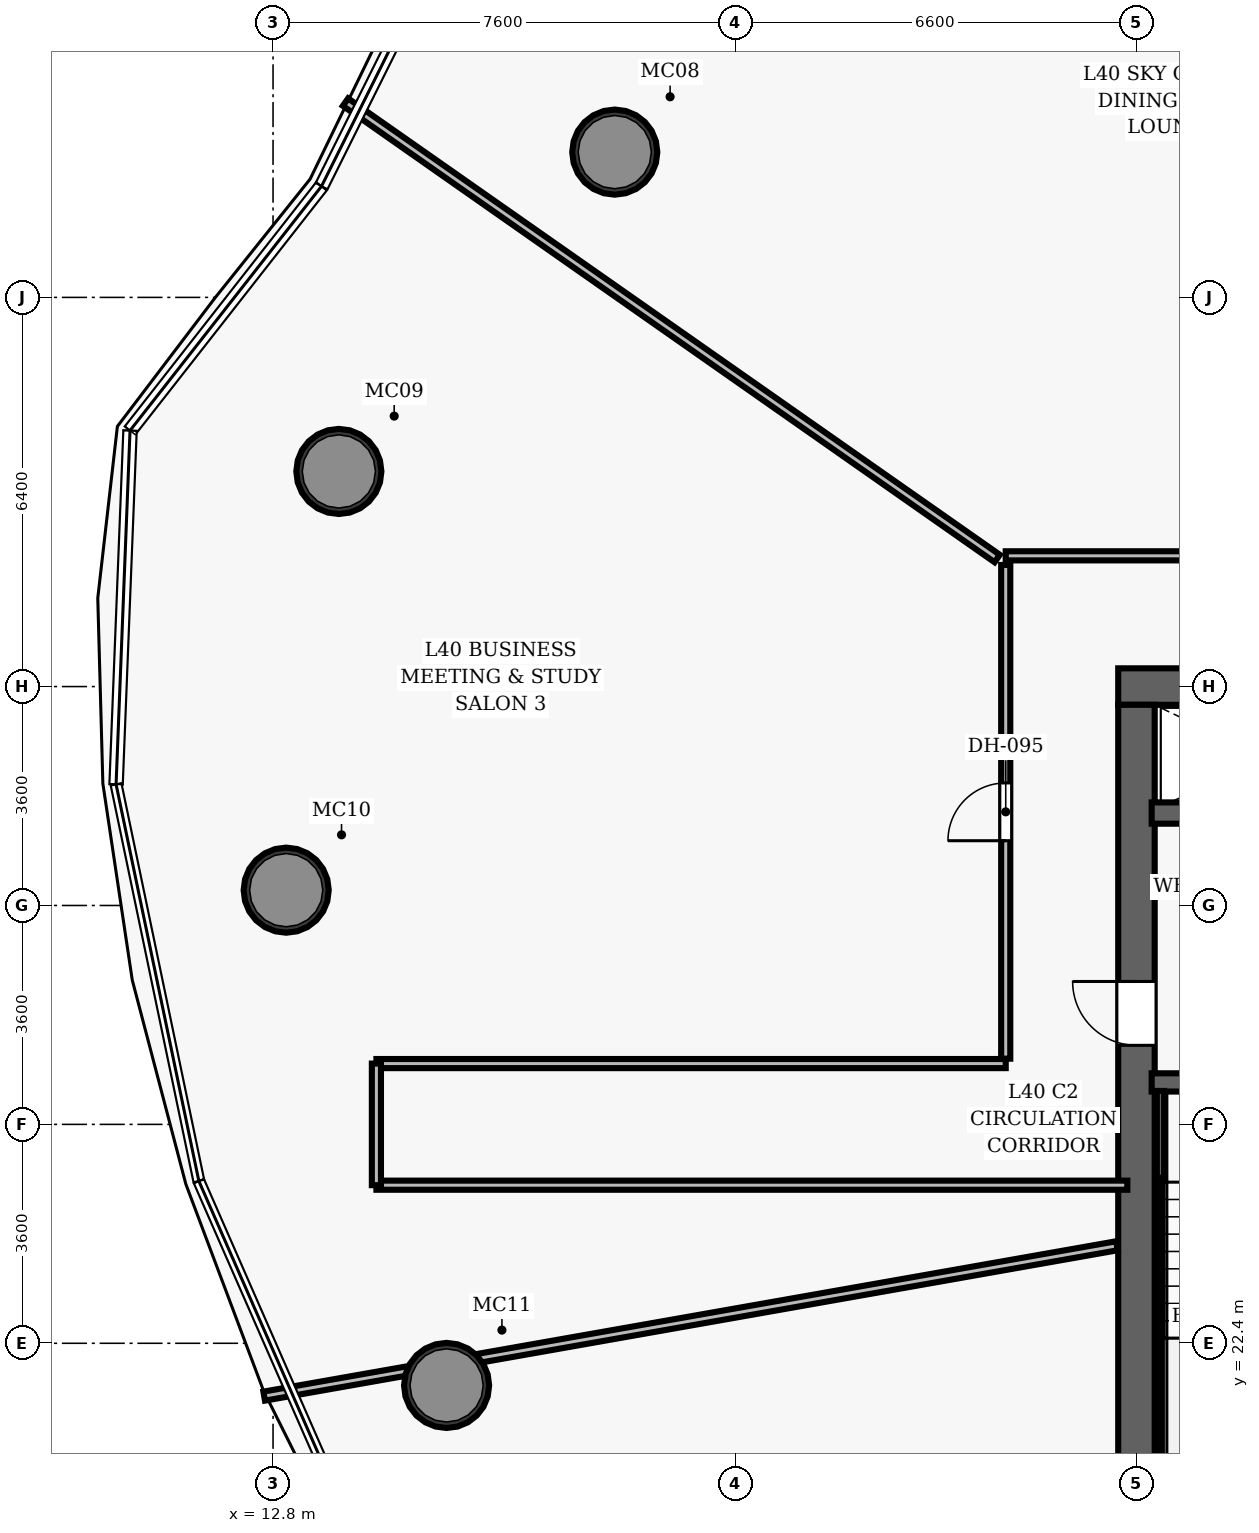
"""IFC4 building model, lengths in metres.
Left out: names, types, materials, properties, quantities, classifications, styles, units other than length and angle.
Written with IfcOpenShell. Run it as: python <this file> out.ifc"""

import sys

from ifc_helpers import new_model, si_unit, direction, frame, frame_2d, origin, origin_2d, place, context, subcontext, project, spatial, rectangle, hollow_circle, extrude, element, fill, save


model = new_model("IFC4")
c1 = context("Model", 3, precision=1e-05, world=origin(), true_north=direction((0.0, 1.0)))
c2 = subcontext(c1, "Body", "Model", "MODEL_VIEW")
j1 = project(units=[si_unit("LENGTHUNIT", "METRE"), si_unit("PLANEANGLEUNIT", "RADIAN")], contexts=[c1])
p1 = place(None, origin())
s1 = spatial("IfcSite", under=j1, at=p1, CompositionType="ELEMENT")
p2 = place(p1, origin())
s2 = spatial("IfcBuilding", under=s1, at=p2, CompositionType="ELEMENT")
p3 = place(p2, frame((0.0, 0.0, 158.8)))
s3 = spatial("IfcBuildingStorey", under=s2, at=p3, CompositionType="ELEMENT", Elevation=158.8)
p4 = place(p3, frame((26.7, 33.2, 0.0), z_axis=(0.0, 0.0, 1.0), x_axis=(1.0, 0.0, 0.0)))
e1 = element("IfcWall", 1, at=p4, inside=s3, PredefinedType="SHEAR", context=c2, shape_type="SweptSolid", body=[
    extrude(rectangle(XDim=22.6, YDim=0.6, at=frame_2d((11.3, 0.0))), origin(), (0.0, 0.0, 1.0), 3.5),
])
p5 = place(p4, frame((4.62, 0.0, 0.0)))
e2 = element("IfcOpeningElement", 2, at=p5, cuts=e1, PredefinedType="OPENING", context=c2, shape_type="SweptSolid", body=[
    extrude(rectangle(XDim=1.05, YDim=2.15, at=frame_2d((0.525, 1.075))), frame((0.0, 0.31, 0.0), z_axis=(0.0, -1.0, 0.0), x_axis=(1.0, 0.0, 0.0)), (0.0, 0.0, 1.0), 0.62),
])
p6 = place(p4, frame((14.52, 0.0, 0.0)))
e3 = element("IfcOpeningElement", 3, at=p6, cuts=e1, PredefinedType="OPENING", context=c2, shape_type="SweptSolid", body=[
    extrude(rectangle(XDim=1.05, YDim=2.15, at=frame_2d((0.525, 1.075))), frame((0.0, 0.31, 0.0), z_axis=(0.0, -1.0, 0.0), x_axis=(1.0, 0.0, 0.0)), (0.0, 0.0, 1.0), 0.62),
])
p7 = place(p3, frame((27.0, 19.1, 0.0), z_axis=(0.0, 0.0, 1.0), x_axis=(0.0, 1.0, 0.0)))
e4 = element("IfcWall", 4, at=p7, inside=s3, PredefinedType="SHEAR", context=c2, shape_type="SweptSolid", body=[
    extrude(rectangle(XDim=13.8, YDim=0.6, at=frame_2d((6.9, 0.0))), origin(), (0.0, 0.0, 1.0), 3.5),
])
p8 = place(p7, frame((8.2, 0.0, 0.0)))
e5 = element("IfcOpeningElement", 5, at=p8, cuts=e4, PredefinedType="OPENING", context=c2, shape_type="SweptSolid", body=[
    extrude(rectangle(XDim=1.05, YDim=2.15, at=frame_2d((0.525, 1.075))), frame((0.0, 0.31, 0.0), z_axis=(0.0, -1.0, 0.0), x_axis=(1.0, 0.0, 0.0)), (0.0, 0.0, 1.0), 0.62),
])
for number, where, z_axis, x_axis in (
    (6, (18.42, 41.989, 0.0), (0.0, 0.0, 1.0), (1.0, 0.0, 0.0)),
    (7, (13.882, 36.738, 0.0), (0.0, 0.0, 1.0), (1.0, 0.0, 0.0)),
    (8, (13.016, 29.852, 0.0), (0.0, 0.0, 1.0), (1.0, 0.0, 0.0)),
    (9, (15.654, 21.707, 0.0), (0.0, 0.0, 1.0), (1.0, 0.0, 0.0)),
):
    element("IfcColumn", number, at=place(p3, frame(where, z_axis=z_axis, x_axis=x_axis)), inside=s3, PredefinedType="COLUMN", context=c2, shape_type="SweptSolid", body=[
        extrude(hollow_circle(Radius=0.7, WallThickness=0.055, at=origin_2d()), origin(), (0.0, 0.0, 1.0), 3.5),
    ])
p9 = place(p3, frame((27.25, 26.69, 0.0), z_axis=(0.0, 0.0, 1.0), x_axis=(1.0, 0.0, 0.0)))
e10 = element("IfcWall", 10, at=p9, inside=s3, PredefinedType="SHEAR", context=c2, shape_type="SweptSolid", body=[
    extrude(rectangle(XDim=3.67, YDim=0.3, at=frame_2d((1.835, 0.0))), origin(), (0.0, 0.0, 1.0), 3.5),
])
p10 = place(p9, frame((1.05, 0.0, 0.0)))
e11 = element("IfcOpeningElement", 11, at=p10, cuts=e10, PredefinedType="OPENING", context=c2, shape_type="SweptSolid", body=[
    extrude(rectangle(XDim=1.1, YDim=2.15, at=frame_2d((0.55, 1.075))), frame((0.0, 0.16, 0.0), z_axis=(0.0, -1.0, 0.0), x_axis=(1.0, 0.0, 0.0)), (0.0, 0.0, 1.0), 0.32),
])
p11 = place(p3, frame((27.395, 19.1, 0.0), z_axis=(0.0, 0.0, 1.0), x_axis=(0.0, 1.0, 0.0)))
e12 = element("IfcWall", 12, at=p11, inside=s3, PredefinedType="SHEAR", context=c2, shape_type="SweptSolid", body=[
    extrude(rectangle(XDim=7.45, YDim=0.12, at=frame_2d((3.725, 0.0))), origin(), (0.0, 0.0, 1.0), 3.5),
])
p12 = place(p3, frame((27.25, 31.12, 0.0), z_axis=(0.0, 0.0, 1.0), x_axis=(1.0, 0.0, 0.0)))
e13 = element("IfcWall", 13, at=p12, inside=s3, PredefinedType="SHEAR", context=c2, shape_type="SweptSolid", body=[
    extrude(rectangle(XDim=3.67, YDim=0.35, at=frame_2d((1.835, 0.0))), origin(), (0.0, 0.0, 1.0), 2.675),
])
p13 = place(p12, frame((1.25, 0.0, 0.0)))
e14 = element("IfcOpeningElement", 14, at=p13, cuts=e13, PredefinedType="OPENING", context=c2, shape_type="SweptSolid", body=[
    extrude(rectangle(XDim=1.1, YDim=2.15, at=frame_2d((0.55, 1.075))), frame((0.0, 0.185, 0.0), z_axis=(0.0, -1.0, 0.0), x_axis=(1.0, 0.0, 0.0)), (0.0, 0.0, 1.0), 0.37),
])
p14 = place(p3, frame((24.85, 35.35, 0.0), z_axis=(0.0, 0.0, 1.0), x_axis=(1.0, 0.0, 0.0)))
e15 = element("IfcWall", 15, at=p14, inside=s3, PredefinedType="PARTITIONING", context=c2, shape_type="SweptSolid", body=[
    extrude(rectangle(XDim=26.0, YDim=0.15, at=frame_2d((13.0, 0.0))), origin(), (0.0, 0.0, 1.0), 2.675),
])
p15 = place(p14, frame((12.935, 0.0, 0.0)))
e16 = element("IfcOpeningElement", 16, at=p15, cuts=e15, PredefinedType="OPENING", context=c2, shape_type="SweptSolid", body=[
    extrude(rectangle(XDim=0.95, YDim=2.15, at=frame_2d((0.475, 1.075))), frame((0.0, 0.085, 0.0), z_axis=(0.0, -1.0, 0.0), x_axis=(1.0, 0.0, 0.0)), (0.0, 0.0, 1.0), 0.17),
])
p16 = place(p14, frame((8.357, 0.0, 0.0)))
e17 = element("IfcOpeningElement", 17, at=p16, cuts=e15, PredefinedType="OPENING", context=c2, shape_type="SweptSolid", body=[
    extrude(rectangle(XDim=0.95, YDim=2.15, at=frame_2d((0.475, 1.075))), frame((0.0, 0.085, 0.0), z_axis=(0.0, -1.0, 0.0), x_axis=(1.0, 0.0, 0.0)), (0.0, 0.0, 1.0), 0.17),
])
p17 = place(p3, frame((24.85, 27.08, 0.0), z_axis=(0.0, 0.0, 1.0), x_axis=(0.0, 1.0, 0.0)))
e18 = element("IfcWall", 18, at=p17, inside=s3, PredefinedType="PARTITIONING", context=c2, shape_type="SweptSolid", body=[
    extrude(rectangle(XDim=8.12, YDim=0.15, at=frame_2d((4.06, 0.0))), origin(), (0.0, 0.0, 1.0), 2.675),
])
p18 = place(p17, frame((3.585, 0.0, 0.0)))
e19 = element("IfcOpeningElement", 19, at=p18, cuts=e18, PredefinedType="OPENING", context=c2, shape_type="SweptSolid", body=[
    extrude(rectangle(XDim=0.95, YDim=2.15, at=frame_2d((0.475, 1.075))), frame((0.0, 0.085, 0.0), z_axis=(0.0, -1.0, 0.0), x_axis=(1.0, 0.0, 0.0)), (0.0, 0.0, 1.0), 0.17),
])
p19 = place(p3, frame((14.5, 27.0, 0.0), z_axis=(0.0, 0.0, 1.0), x_axis=(1.0, 0.0, 0.0)))
e20 = element("IfcWall", 20, at=p19, inside=s3, PredefinedType="PARTITIONING", context=c2, shape_type="SweptSolid", body=[
    extrude(rectangle(XDim=10.35, YDim=0.15, at=frame_2d((5.175, 0.0))), origin(), (0.0, 0.0, 1.0), 2.675),
])
p20 = place(p3, frame((14.5, 25.0, 0.0), z_axis=(0.0, 0.0, 1.0), x_axis=(1.0, 0.0, 0.0)))
e21 = element("IfcWall", 21, at=p20, inside=s3, PredefinedType="PARTITIONING", context=c2, shape_type="SweptSolid", body=[
    extrude(rectangle(XDim=12.35, YDim=0.15, at=frame_2d((6.175, 0.0))), origin(), (0.0, 0.0, 1.0), 2.675),
])
p21 = place(p3, frame((14.5, 25.0, 0.0), z_axis=(0.0, 0.0, 1.0), x_axis=(0.0, 1.0, 0.0)))
e22 = element("IfcWall", 22, at=p21, inside=s3, PredefinedType="PARTITIONING", context=c2, shape_type="SweptSolid", body=[
    extrude(rectangle(XDim=2.0, YDim=0.15, at=frame_2d((1.0, 0.0))), origin(), (0.0, 0.0, 1.0), 2.675),
])
p22 = place(p3, frame((24.71, 35.306, 0.0), z_axis=(0.0, 0.0, 1.0), x_axis=(-0.819153898842, 0.573573787766, 0.0)))
e23 = element("IfcWall", 23, at=p22, inside=s3, PredefinedType="PARTITIONING", context=c2, shape_type="SweptSolid", body=[
    extrude(rectangle(XDim=13.085, YDim=0.15, at=frame_2d((6.542, 0.0))), origin(), (0.0, 0.0, 1.0), 2.675),
])
p23 = place(p3, frame((26.68, 24.004, 0.0), z_axis=(0.0, 0.0, 1.0), x_axis=(-0.984810123678, -0.173634732419, 0.0)))
e24 = element("IfcWall", 24, at=p23, inside=s3, PredefinedType="PARTITIONING", context=c2, shape_type="SweptSolid", body=[
    extrude(rectangle(XDim=14.242, YDim=0.15, at=frame_2d((7.121, 0.0))), origin(), (0.0, 0.0, 1.0), 2.675),
])
p24 = place(p8, origin())
e25 = element("IfcDoor", 25, at=p24, inside=s3, OperationType="SINGLE_SWING_RIGHT", PredefinedType="DOOR", context=c2, shape_type="SweptSolid", body=[
    extrude(rectangle(XDim=1.05, YDim=2.15, at=frame_2d((0.525, 1.075))), frame((0.0, 0.025, 0.0), z_axis=(0.0, -1.0, 0.0), x_axis=(1.0, 0.0, 0.0)), (0.0, 0.0, 1.0), 0.05),
])
fill(e5, e25)
p25 = place(p18, origin())
e26 = element("IfcDoor", 26, at=p25, inside=s3, OperationType="SINGLE_SWING_LEFT", PredefinedType="DOOR", context=c2, shape_type="SweptSolid", body=[
    extrude(rectangle(XDim=0.95, YDim=2.15, at=frame_2d((0.475, 1.075))), frame((0.0, 0.025, 0.0), z_axis=(0.0, -1.0, 0.0), x_axis=(1.0, 0.0, 0.0)), (0.0, 0.0, 1.0), 0.05),
])
fill(e19, e26)
save(model, sys.argv[1])
